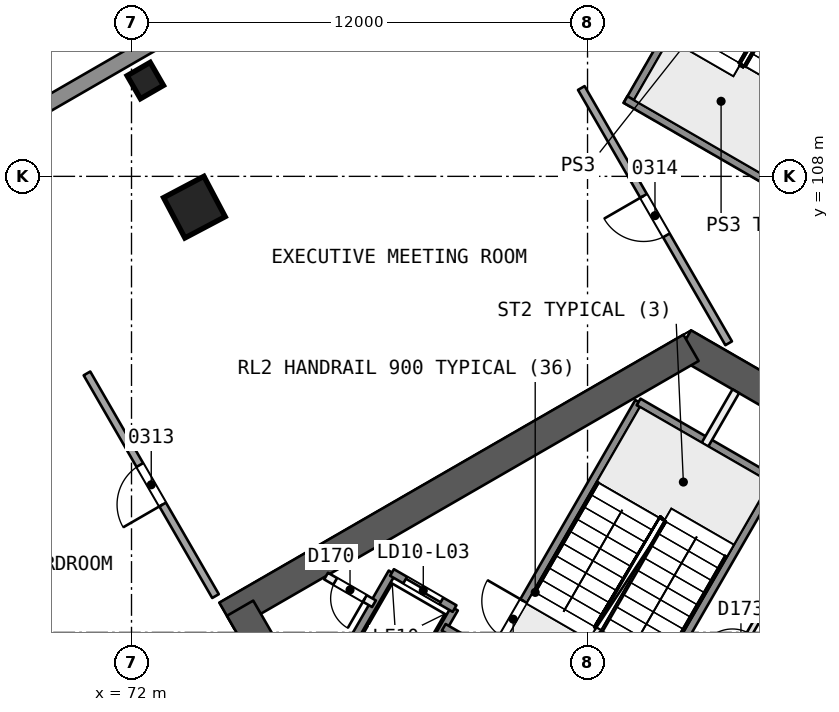
"""IFC4 building model, lengths in metres.
Left out: names, types, materials, properties, quantities, classifications, styles, units other than length and angle.
Written with IfcOpenShell. Run it as: python <this file> out.ifc"""

import sys

from ifc_helpers import new_model, si_unit, direction, frame, frame_2d, origin, origin_2d, place, context, subcontext, project, spatial, rectangle, extrude, element, fill, save


model = new_model("IFC4")
c1 = context("Model", 3, precision=1e-05, world=origin(), true_north=direction((0.0, 1.0)))
c2 = subcontext(c1, "Body", "Model", "MODEL_VIEW")
j1 = project(units=[si_unit("LENGTHUNIT", "METRE"), si_unit("PLANEANGLEUNIT", "RADIAN")], contexts=[c1])
p1 = place(None, origin())
s1 = spatial("IfcSite", under=j1, at=p1, CompositionType="ELEMENT")
p2 = place(p1, origin())
s2 = spatial("IfcBuilding", under=s1, at=p2, CompositionType="ELEMENT")
p3 = place(p2, frame((0.0, 0.0, 20.4)))
s3 = spatial("IfcBuildingStorey", under=s2, at=p3, CompositionType="ELEMENT", Elevation=20.4)
p4 = place(p3, frame((89.48, 101.897, 0.0), z_axis=(0.0, 0.0, 1.0), x_axis=(-0.866034355626, 0.499984494636, 0.0)))
e1 = element("IfcWall", 1, at=p4, inside=s3, PredefinedType="SHEAR", context=c2, shape_type="SweptSolid", body=[
    extrude(rectangle(XDim=3.414, YDim=0.8, at=frame_2d((1.707, 0.0))), origin(), (0.0, 0.0, 1.0), 5.0),
])
p5 = place(p3, frame((86.723, 103.488, 0.0), z_axis=(0.0, 0.0, 1.0), x_axis=(-0.866032504327, -0.499987701298, 0.0)))
e2 = element("IfcWall", 2, at=p5, inside=s3, PredefinedType="SHEAR", context=c2, shape_type="SweptSolid", body=[
    extrude(rectangle(XDim=14.102, YDim=0.8, at=frame_2d((7.051, 0.0))), origin(), (0.0, 0.0, 1.0), 5.0),
])
p6 = place(p3, frame((74.856, 96.637, 0.0), z_axis=(0.0, 0.0, 1.0), x_axis=(0.499993500917, -0.866029155999, 0.0)))
e3 = element("IfcWall", 3, at=p6, inside=s3, PredefinedType="SHEAR", context=c2, shape_type="SweptSolid", body=[
    extrude(rectangle(XDim=9.98, YDim=0.8, at=frame_2d((4.99, 0.0))), origin(), (0.0, 0.0, 1.0), 5.0),
])
p7 = place(p6, frame((7.83, 0.0, 0.0)))
e4 = element("IfcOpeningElement", 4, at=p7, cuts=e3, PredefinedType="OPENING", context=c2, shape_type="SweptSolid", body=[
    extrude(rectangle(XDim=1.2, YDim=2.1, at=frame_2d((0.6, 1.05))), frame((0.0, 0.411, 0.0), z_axis=(0.0, -1.0, 0.0), x_axis=(1.0, 0.0, 0.0)), (0.0, 0.0, 1.0), 0.821),
])
p8 = place(p3, frame((73.654, 107.217, 0.0), z_axis=(0.000878676521, -0.022845589543, 0.999738619323), x_axis=(0.865610658268, 0.500603787219, 0.010678788114)))
e5 = element("IfcColumn", 5, at=p8, inside=s3, PredefinedType="COLUMN", context=c2, shape_type="SweptSolid", body=[
    extrude(rectangle(XDim=1.2, YDim=1.2, at=origin_2d()), origin(), (0.0, 0.0, 1.0), 5.001),
])
p9 = place(p3, frame((72.363, 110.521, 0.0), z_axis=(0.0, 0.0, 1.0), x_axis=(0.866025403784, 0.5, 0.0)))
e6 = element("IfcColumn", 6, at=p9, inside=s3, PredefinedType="COLUMN", context=c2, shape_type="SweptSolid", body=[
    extrude(rectangle(XDim=0.7, YDim=0.7, at=origin_2d()), origin(), (0.0, 0.0, 1.0), 5.0),
])
p10 = place(p3, frame((62.2, 105.289, 0.0), z_axis=(0.0, 0.0, 1.0), x_axis=(0.49999717083, -0.8660270372, 0.0)))
e7 = element("IfcWall", 7, at=p10, inside=s3, PredefinedType="PARTITIONING", context=c2, shape_type="SweptSolid", body=[
    extrude(rectangle(XDim=17.001, YDim=0.2, at=frame_2d((8.5, 0.0))), origin(), (0.0, 0.0, 1.0), 4.5),
])
p11 = place(p3, frame((74.21, 96.956, 0.0), z_axis=(0.0, 0.0, 1.0), x_axis=(-0.499981745636, 0.86603594269, 0.0)))
e8 = element("IfcWall", 8, at=p11, inside=s3, PredefinedType="PARTITIONING", context=c2, shape_type="SweptSolid", body=[
    extrude(rectangle(XDim=6.765, YDim=0.2, at=frame_2d((3.382, 0.0))), origin(), (0.0, 0.0, 1.0), 4.5),
])
p12 = place(p11, frame((2.782, 0.0, 0.0)))
e9 = element("IfcOpeningElement", 9, at=p12, cuts=e8, PredefinedType="OPENING", context=c2, shape_type="SweptSolid", body=[
    extrude(rectangle(XDim=1.2, YDim=2.4, at=frame_2d((0.6, 1.2))), frame((0.0, 0.11, 0.0), z_axis=(0.0, -1.0, 0.0), x_axis=(1.0, 0.0, 0.0)), (0.0, 0.0, 1.0), 0.221),
])
p13 = place(p3, frame((87.714, 103.608, 0.0), z_axis=(0.0, 0.0, 1.0), x_axis=(-0.500002221596, 0.866024121142, 0.0)))
e10 = element("IfcWall", 10, at=p13, inside=s3, PredefinedType="PARTITIONING", context=c2, shape_type="SweptSolid", body=[
    extrude(rectangle(XDim=7.755, YDim=0.2, at=frame_2d((3.878, 0.0))), origin(), (0.0, 0.0, 1.0), 4.5),
])
p14 = place(p13, frame((3.278, 0.0, 0.0)))
e11 = element("IfcOpeningElement", 11, at=p14, cuts=e10, PredefinedType="OPENING", context=c2, shape_type="SweptSolid", body=[
    extrude(rectangle(XDim=1.2, YDim=2.4, at=frame_2d((0.6, 1.2))), frame((0.0, 0.11, 0.0), z_axis=(0.0, -1.0, 0.0), x_axis=(1.0, 0.0, 0.0)), (0.0, 0.0, 1.0), 0.221),
])
p15 = place(p3, frame((26.66, 85.0, 0.0), z_axis=(0.0, 0.0, 1.0), x_axis=(0.866025599265, 0.499999661418, 0.0)))
e12 = element("IfcWall", 12, at=p15, inside=s3, PredefinedType="SOLIDWALL", context=c2, shape_type="SweptSolid", body=[
    extrude(rectangle(XDim=78.727, YDim=0.4, at=frame_2d((39.364, 0.0))), origin(), (0.0, 0.0, 1.0), 4.5),
])
p16 = place(p15, frame((42.84, 0.0, 0.9)))
e13 = element("IfcOpeningElement", 13, at=p16, cuts=e12, PredefinedType="OPENING", context=c2, shape_type="SweptSolid", body=[
    extrude(rectangle(XDim=2.4, YDim=2.4, at=frame_2d((1.2, 1.2))), frame((0.0, 0.21, 0.0), z_axis=(0.0, -1.0, 0.0), x_axis=(1.0, 0.0, 0.0)), (0.0, 0.0, 1.0), 0.421),
])
p17 = place(p15, frame((37.385, 0.0, 0.9)))
e14 = element("IfcOpeningElement", 14, at=p17, cuts=e12, PredefinedType="OPENING", context=c2, shape_type="SweptSolid", body=[
    extrude(rectangle(XDim=2.4, YDim=2.4, at=frame_2d((1.2, 1.2))), frame((0.0, 0.21, 0.0), z_axis=(0.0, -1.0, 0.0), x_axis=(1.0, 0.0, 0.0)), (0.0, 0.0, 1.0), 0.421),
])
p18 = place(p15, frame((32.708, 0.0, 0.9)))
e15 = element("IfcOpeningElement", 15, at=p18, cuts=e12, PredefinedType="OPENING", context=c2, shape_type="SweptSolid", body=[
    extrude(rectangle(XDim=2.4, YDim=2.4, at=frame_2d((1.2, 1.2))), frame((0.0, 0.21, 0.0), z_axis=(0.0, -1.0, 0.0), x_axis=(1.0, 0.0, 0.0)), (0.0, 0.0, 1.0), 0.421),
])
p19 = place(p3, frame((87.021, 93.821, 0.0), z_axis=(0.0, 0.0, 1.0), x_axis=(0.500028662945, 0.866008854593, 0.0)))
e16 = element("IfcWall", 16, at=p19, inside=s3, PredefinedType="PARTITIONING", context=c2, shape_type="SweptSolid", body=[
    extrude(rectangle(XDim=4.118, YDim=0.15, at=frame_2d((2.059, 0.0))), origin(), (0.0, 0.0, 1.0), 4.5),
])
p20 = place(p19, frame((1.582, 0.0, 0.0)))
e17 = element("IfcOpeningElement", 17, at=p20, cuts=e16, PredefinedType="OPENING", context=c2, shape_type="SweptSolid", body=[
    extrude(rectangle(XDim=0.9, YDim=2.1, at=frame_2d((0.45, 1.05))), frame((0.0, 0.085, 0.0), z_axis=(0.0, -1.0, 0.0), x_axis=(1.0, 0.0, 0.0)), (0.0, 0.0, 1.0), 0.171),
])
p21 = place(p3, frame((85.087, 93.321, 0.0), z_axis=(0.0, 0.0, 1.0), x_axis=(0.500019787375, 0.866013979237, 0.0)))
e18 = element("IfcWall", 18, at=p21, inside=s3, PredefinedType="SOLIDWALL", context=c2, shape_type="SweptSolid", body=[
    extrude(rectangle(XDim=7.7, YDim=0.2, at=frame_2d((3.85, 0.0))), origin(), (0.0, 0.0, 1.0), 4.5),
])
p22 = place(p3, frame((87.09, 100.94, 0.0), z_axis=(0.0, 0.0, 1.0), x_axis=(0.499956811548, 0.866050337213, 0.0)))
e19 = element("IfcWall", 19, at=p22, inside=s3, PredefinedType="PARTITIONING", context=c2, shape_type="SweptSolid", body=[
    extrude(rectangle(XDim=1.623, YDim=0.2, at=frame_2d((0.812, 0.0))), origin(), (0.0, 0.0, 1.0), 4.5),
])
p23 = place(p3, frame((81.493, 95.396, 0.0), z_axis=(0.0, 0.0, 1.0), x_axis=(0.500006057782, 0.866021906294, 0.0)))
e20 = element("IfcWall", 20, at=p23, inside=s3, PredefinedType="SOLIDWALL", context=c2, shape_type="SweptSolid", body=[
    extrude(rectangle(XDim=7.7, YDim=0.2, at=frame_2d((3.85, 0.0))), origin(), (0.0, 0.0, 1.0), 4.5),
])
p24 = place(p23, frame((0.55, 0.0, 0.0)))
e21 = element("IfcOpeningElement", 21, at=p24, cuts=e20, PredefinedType="OPENING", context=c2, shape_type="SweptSolid", body=[
    extrude(rectangle(XDim=1.1, YDim=2.1, at=frame_2d((0.55, 1.05))), frame((0.0, 0.11, 0.0), z_axis=(0.0, -1.0, 0.0), x_axis=(1.0, 0.0, 0.0)), (0.0, 0.0, 1.0), 0.221),
])
for number, where, z_axis, x_axis in (
    (22, (78.976, 93.986, 0.0), (0.0, 0.0, 1.0), (0.5, 0.866, 0.0)),
    (23, (77.33, 94.936, 0.0), (0.0, 0.0, 1.0), (0.5, 0.866, 0.0)),
):
    element("IfcWall", number, at=place(p3, frame(where, z_axis=z_axis, x_axis=x_axis)), inside=s3, PredefinedType="SOLIDWALL", context=c2, shape_type="SweptSolid", body=[
        extrude(rectangle(XDim=3.05, YDim=0.2, at=frame_2d((1.525, 0.0))), origin(), (0.0, 0.0, 1.0), 4.5),
    ])
p25 = place(p3, frame((78.38, 96.755, 0.0), z_axis=(0.0, 0.0, 1.0), x_axis=(-0.866003949776, 0.500037157592, 0.0)))
e24 = element("IfcWall", 24, at=p25, inside=s3, PredefinedType="PARTITIONING", context=c2, shape_type="SweptSolid", body=[
    extrude(rectangle(XDim=1.455, YDim=0.2, at=frame_2d((0.728, 0.0))), origin(), (0.0, 0.0, 1.0), 4.5),
])
p26 = place(p25, frame((0.278, 0.0, 0.0)))
e25 = element("IfcOpeningElement", 25, at=p26, cuts=e24, PredefinedType="OPENING", context=c2, shape_type="SweptSolid", body=[
    extrude(rectangle(XDim=0.9, YDim=2.1, at=frame_2d((0.45, 1.05))), frame((0.0, 0.11, 0.0), z_axis=(0.0, -1.0, 0.0), x_axis=(1.0, 0.0, 0.0)), (0.0, 0.0, 1.0), 0.221),
])
p27 = place(p3, frame((88.01, 91.634, 0.0), z_axis=(0.0, 0.0, 1.0), x_axis=(-0.866024315419, 0.5000018851, 0.0)))
e26 = element("IfcWall", 26, at=p27, inside=s3, PredefinedType="SOLIDWALL", context=c2, shape_type="SweptSolid", body=[
    extrude(rectangle(XDim=9.0, YDim=0.2, at=frame_2d((4.5, 0.0))), origin(), (0.0, 0.0, 1.0), 4.5),
])
p28 = place(p3, frame((80.5, 96.627, 0.0), z_axis=(0.0, 0.0, 1.0), x_axis=(-0.86601224135, 0.500022797313, 0.0)))
e27 = element("IfcWall", 27, at=p28, inside=s3, PredefinedType="SOLIDWALL", context=c2, shape_type="SweptSolid", body=[
    extrude(rectangle(XDim=1.9, YDim=0.2, at=frame_2d((0.95, 0.0))), origin(), (0.0, 0.0, 1.0), 4.5),
])
p29 = place(p28, frame((0.4, 0.0, 0.0)))
e28 = element("IfcOpeningElement", 28, at=p29, cuts=e27, PredefinedType="OPENING", context=c2, shape_type="SweptSolid", body=[
    extrude(rectangle(XDim=1.1, YDim=2.1, at=frame_2d((0.55, 1.05))), frame((0.0, 0.11, 0.0), z_axis=(0.0, -1.0, 0.0), x_axis=(1.0, 0.0, 0.0)), (0.0, 0.0, 1.0), 0.221),
])
p30 = place(p3, frame((88.937, 99.99, 0.0), z_axis=(0.0, 0.0, 1.0), x_axis=(-0.866004344652, 0.500036473714, 0.0)))
e29 = element("IfcWall", 29, at=p30, inside=s3, PredefinedType="SOLIDWALL", context=c2, shape_type="SweptSolid", body=[
    extrude(rectangle(XDim=4.15, YDim=0.2, at=frame_2d((2.075, 0.0))), origin(), (0.0, 0.0, 1.0), 4.5),
])
p31 = place(p3, frame((89.037, 116.813, -0.4), z_axis=(0.0, 0.0, 1.0), x_axis=(-0.49999894854, -0.866026010844, 0.0)))
e30 = element("IfcWall", 30, at=p31, inside=s3, PredefinedType="SOLIDWALL", context=c2, shape_type="SweptSolid", body=[
    extrude(rectangle(XDim=8.0, YDim=0.2, at=frame_2d((4.0, 0.0))), origin(), (0.0, 0.0, 1.0), 4.9),
])
p32 = place(p3, frame((85.001, 110.022, -0.4), z_axis=(0.0, 0.0, 1.0), x_axis=(0.866032203192, -0.499988222896, 0.0)))
e31 = element("IfcWall", 31, at=p32, inside=s3, PredefinedType="SOLIDWALL", context=c2, shape_type="SweptSolid", body=[
    extrude(rectangle(XDim=4.4, YDim=0.2, at=frame_2d((2.2, 0.0))), origin(), (0.0, 0.0, 1.0), 4.9),
])
p33 = place(p12, origin())
e32 = element("IfcDoor", 32, at=p33, inside=s3, OperationType="SINGLE_SWING_LEFT", PredefinedType="NOTDEFINED", context=c2, shape_type="SweptSolid", body=[
    extrude(rectangle(XDim=1.2, YDim=2.4, at=frame_2d((0.6, 1.2))), frame((0.0, 0.025, 0.0), z_axis=(0.0, -1.0, 0.0), x_axis=(1.0, 0.0, 0.0)), (0.0, 0.0, 1.0), 0.05),
])
fill(e9, e32)
p34 = place(p14, origin())
e33 = element("IfcDoor", 33, at=p34, inside=s3, OperationType="SINGLE_SWING_RIGHT", PredefinedType="NOTDEFINED", context=c2, shape_type="SweptSolid", body=[
    extrude(rectangle(XDim=1.2, YDim=2.4, at=frame_2d((0.6, 1.2))), frame((0.0, 0.025, 0.0), z_axis=(0.0, -1.0, 0.0), x_axis=(1.0, 0.0, 0.0)), (0.0, 0.0, 1.0), 0.05),
])
fill(e11, e33)
p35 = place(p29, origin())
e34 = element("IfcDoor", 34, at=p35, inside=s3, OperationType="SLIDING_TO_RIGHT", PredefinedType="NOTDEFINED", context=c2, shape_type="SweptSolid", body=[
    extrude(rectangle(XDim=1.1, YDim=2.1, at=frame_2d((0.55, 1.05))), frame((0.0, 0.025, 0.0), z_axis=(0.0, -1.0, 0.0), x_axis=(1.0, 0.0, 0.0)), (0.0, 0.0, 1.0), 0.05),
])
fill(e28, e34)
p36 = place(p26, origin())
e35 = element("IfcDoor", 35, at=p36, inside=s3, OperationType="SINGLE_SWING_LEFT", PredefinedType="NOTDEFINED", context=c2, shape_type="SweptSolid", body=[
    extrude(rectangle(XDim=0.9, YDim=2.1, at=frame_2d((0.45, 1.05))), frame((0.0, 0.025, 0.0), z_axis=(0.0, -1.0, 0.0), x_axis=(1.0, 0.0, 0.0)), (0.0, 0.0, 1.0), 0.05),
])
fill(e25, e35)
p37 = place(p24, origin())
e36 = element("IfcDoor", 36, at=p37, inside=s3, OperationType="SINGLE_SWING_RIGHT", PredefinedType="NOTDEFINED", context=c2, shape_type="SweptSolid", body=[
    extrude(rectangle(XDim=1.1, YDim=2.1, at=frame_2d((0.55, 1.05))), frame((0.0, 0.025, 0.0), z_axis=(0.0, -1.0, 0.0), x_axis=(1.0, 0.0, 0.0)), (0.0, 0.0, 1.0), 0.05),
])
fill(e21, e36)
save(model, sys.argv[1])
